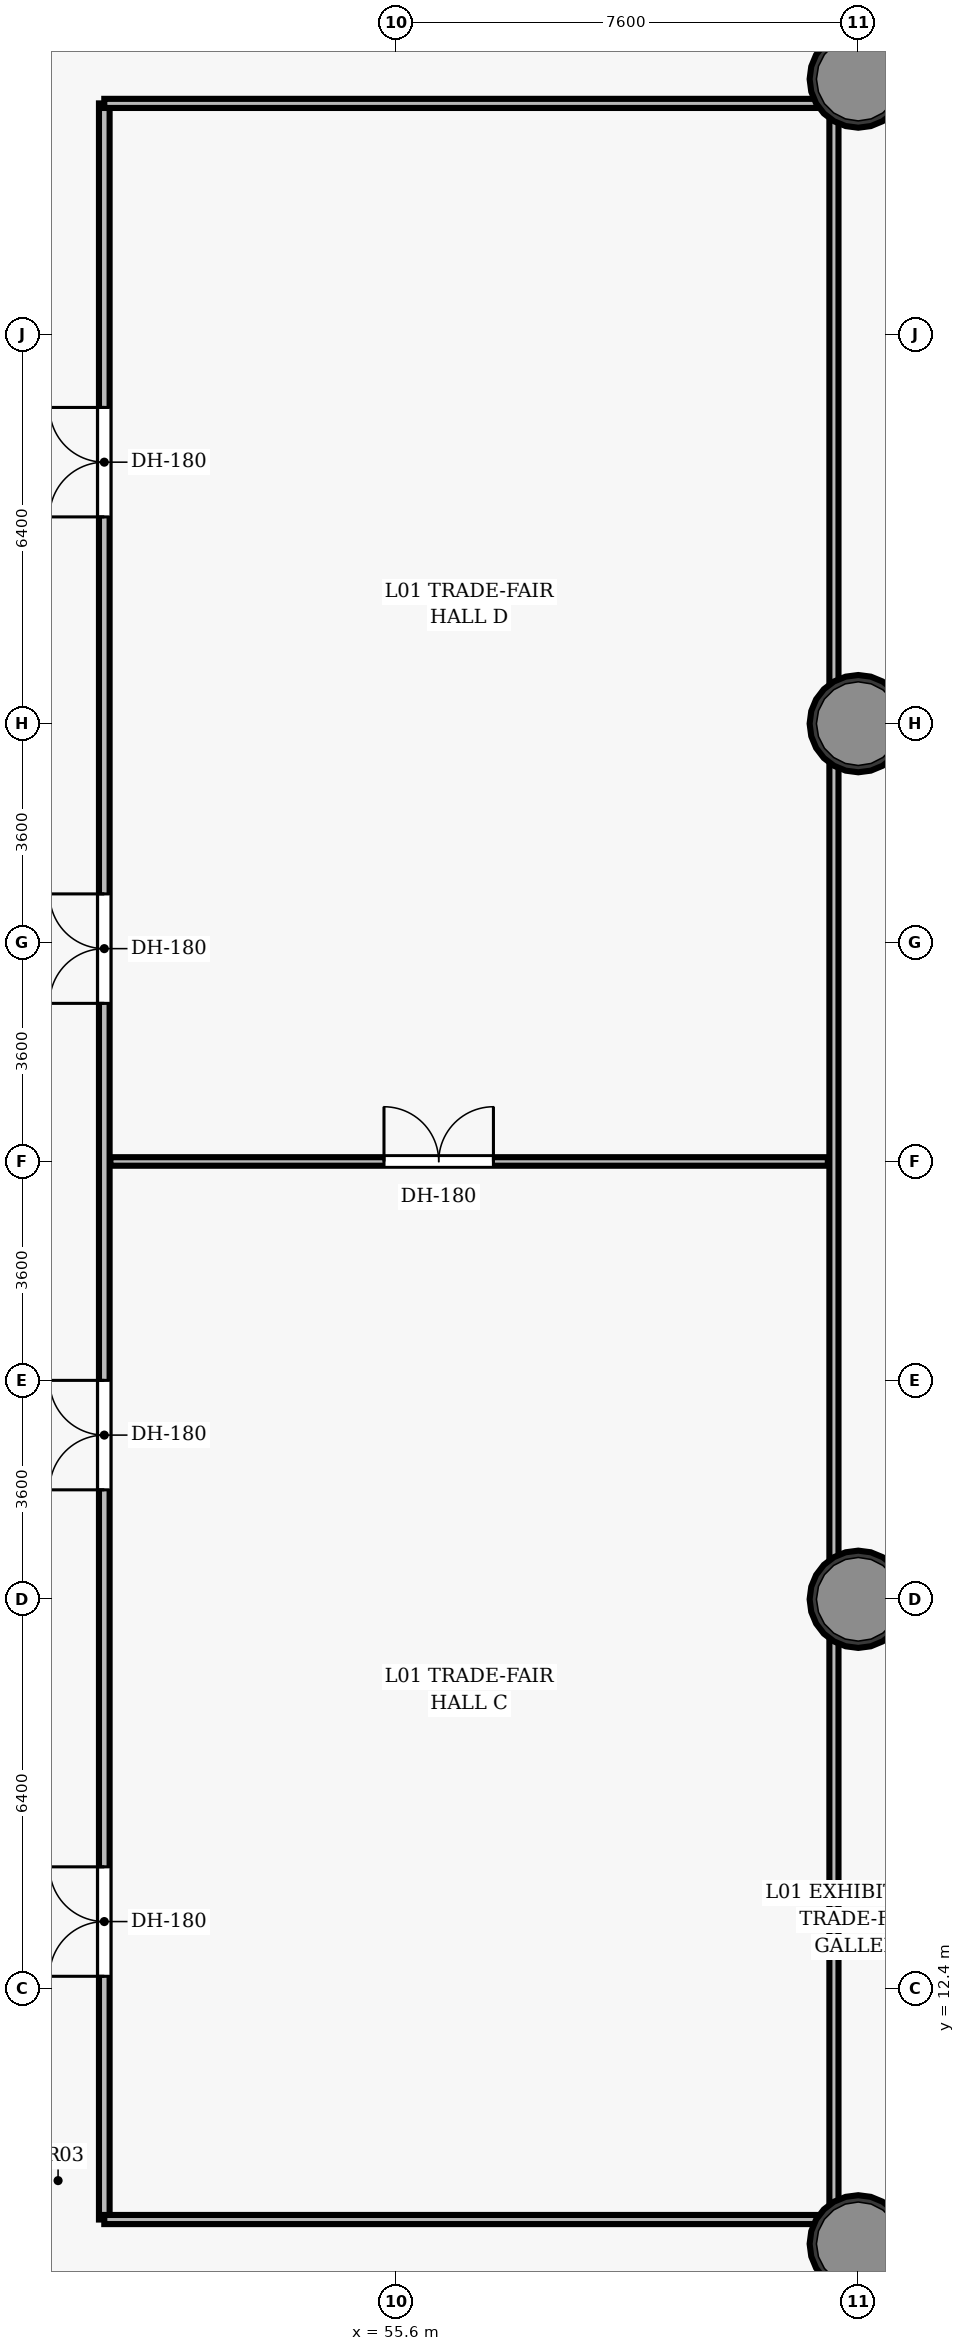
"""IFC4 building model, lengths in metres.
Left out: names, types, materials, properties, quantities, classifications, styles, units other than length and angle.
Written with IfcOpenShell. Run it as: python <this file> out.ifc"""

import sys

from ifc_helpers import new_model, si_unit, direction, frame, frame_2d, origin, origin_2d, place, context, subcontext, project, spatial, rectangle, hollow_circle, extrude, element, fill, save


model = new_model("IFC4")
c1 = context("Model", 3, precision=1e-05, world=origin(), true_north=direction((0.0, 1.0)))
c2 = subcontext(c1, "Body", "Model", "MODEL_VIEW")
j1 = project(units=[si_unit("LENGTHUNIT", "METRE"), si_unit("PLANEANGLEUNIT", "RADIAN")], contexts=[c1])
p1 = place(None, origin())
s1 = spatial("IfcSite", under=j1, at=p1, CompositionType="ELEMENT")
p2 = place(p1, origin())
s2 = spatial("IfcBuilding", under=s1, at=p2, CompositionType="ELEMENT")
p3 = place(p2, frame((0.0, 0.0, 6.6)))
s3 = spatial("IfcBuildingStorey", under=s2, at=p3, CompositionType="ELEMENT", Elevation=6.6)
for number, where, z_axis, x_axis in (
    (1, (63.2, 8.2, 0.0), (0.0, 0.0, 1.0), (1.0, 0.0, 0.0)),
    (2, (63.2, 18.8, 0.0), (0.0, 0.0, 1.0), (1.0, 0.0, 0.0)),
    (3, (63.2, 33.2, 0.0), (0.0, 0.0, 1.0), (1.0, 0.0, 0.0)),
    (4, (63.2, 43.8, 0.0), (0.0, 0.0, 1.0), (1.0, 0.0, 0.0)),
):
    element("IfcColumn", number, at=place(p3, frame(where, z_axis=z_axis, x_axis=x_axis)), inside=s3, PredefinedType="COLUMN", context=c2, shape_type="SweptSolid", body=[
        extrude(hollow_circle(Radius=0.8, WallThickness=0.06, at=origin_2d()), origin(), (0.0, 0.0, 1.0), 5.4),
    ])
p4 = place(p3, frame((50.8, 8.6, 0.0), z_axis=(0.0, 0.0, 1.0), x_axis=(0.0, 1.0, 0.0)))
e5 = element("IfcWall", 5, at=p4, inside=s3, PredefinedType="PARTITIONING", context=c2, shape_type="SweptSolid", body=[
    extrude(rectangle(XDim=34.8, YDim=0.175, at=frame_2d((17.4, 0.0))), origin(), (0.0, 0.0, 1.0), 4.11),
])
p5 = place(p4, frame((4.0, 0.0, 0.0)))
e6 = element("IfcOpeningElement", 6, at=p5, cuts=e5, PredefinedType="OPENING", context=c2, shape_type="SweptSolid", body=[
    extrude(rectangle(XDim=1.8, YDim=2.35, at=frame_2d((0.9, 1.175))), frame((0.0, 0.097, 0.0), z_axis=(0.0, -1.0, 0.0), x_axis=(1.0, 0.0, 0.0)), (0.0, 0.0, 1.0), 0.195),
])
p6 = place(p4, frame((12.0, 0.0, 0.0)))
e7 = element("IfcOpeningElement", 7, at=p6, cuts=e5, PredefinedType="OPENING", context=c2, shape_type="SweptSolid", body=[
    extrude(rectangle(XDim=1.8, YDim=2.35, at=frame_2d((0.9, 1.175))), frame((0.0, 0.097, 0.0), z_axis=(0.0, -1.0, 0.0), x_axis=(1.0, 0.0, 0.0)), (0.0, 0.0, 1.0), 0.195),
])
p7 = place(p4, frame((20.0, 0.0, 0.0)))
e8 = element("IfcOpeningElement", 8, at=p7, cuts=e5, PredefinedType="OPENING", context=c2, shape_type="SweptSolid", body=[
    extrude(rectangle(XDim=1.8, YDim=2.35, at=frame_2d((0.9, 1.175))), frame((0.0, 0.097, 0.0), z_axis=(0.0, -1.0, 0.0), x_axis=(1.0, 0.0, 0.0)), (0.0, 0.0, 1.0), 0.195),
])
p8 = place(p4, frame((28.0, 0.0, 0.0)))
e9 = element("IfcOpeningElement", 9, at=p8, cuts=e5, PredefinedType="OPENING", context=c2, shape_type="SweptSolid", body=[
    extrude(rectangle(XDim=1.8, YDim=2.35, at=frame_2d((0.9, 1.175))), frame((0.0, 0.097, 0.0), z_axis=(0.0, -1.0, 0.0), x_axis=(1.0, 0.0, 0.0)), (0.0, 0.0, 1.0), 0.195),
])
for number, where, z_axis, x_axis in (
    (10, (50.8, 8.6, 0.0), (0.0, 0.0, 1.0), (1.0, 0.0, 0.0)),
    (11, (50.8, 43.4, 0.0), (0.0, 0.0, 1.0), (1.0, 0.0, 0.0)),
):
    element("IfcWall", number, at=place(p3, frame(where, z_axis=z_axis, x_axis=x_axis)), inside=s3, PredefinedType="PARTITIONING", context=c2, shape_type="SweptSolid", body=[
        extrude(rectangle(XDim=12.0, YDim=0.15, at=frame_2d((6.0, 0.0))), origin(), (0.0, 0.0, 1.0), 4.11),
    ])
p9 = place(p3, frame((62.8, 8.6, 0.0), z_axis=(0.0, 0.0, 1.0), x_axis=(0.0, 1.0, 0.0)))
e12 = element("IfcWall", 12, at=p9, inside=s3, PredefinedType="PARTITIONING", context=c2, shape_type="SweptSolid", body=[
    extrude(rectangle(XDim=34.8, YDim=0.15, at=frame_2d((17.4, 0.0))), origin(), (0.0, 0.0, 1.0), 4.11),
])
p10 = place(p3, frame((50.9, 26.0, 0.0), z_axis=(0.0, 0.0, 1.0), x_axis=(1.0, 0.0, 0.0)))
e13 = element("IfcWall", 13, at=p10, inside=s3, PredefinedType="MOVABLE", context=c2, shape_type="SweptSolid", body=[
    extrude(rectangle(XDim=11.8, YDim=0.14, at=frame_2d((5.9, 0.0))), origin(), (0.0, 0.0, 1.0), 4.11),
])
p11 = place(p10, frame((4.5, 0.0, 0.0)))
e14 = element("IfcOpeningElement", 14, at=p11, cuts=e13, PredefinedType="OPENING", context=c2, shape_type="SweptSolid", body=[
    extrude(rectangle(XDim=1.8, YDim=2.35, at=frame_2d((0.9, 1.175))), frame((0.0, 0.08, 0.0), z_axis=(0.0, -1.0, 0.0), x_axis=(1.0, 0.0, 0.0)), (0.0, 0.0, 1.0), 0.16),
])
p12 = place(p11, origin())
e15 = element("IfcDoor", 15, at=p12, inside=s3, OperationType="DOUBLE_DOOR_SINGLE_SWING", PredefinedType="DOOR", context=c2, shape_type="SweptSolid", body=[
    extrude(rectangle(XDim=1.8, YDim=2.35, at=frame_2d((0.9, 1.175))), frame((0.0, 0.025, 0.0), z_axis=(0.0, -1.0, 0.0), x_axis=(1.0, 0.0, 0.0)), (0.0, 0.0, 1.0), 0.05),
])
fill(e14, e15)
p13 = place(p5, origin())
e16 = element("IfcDoor", 16, at=p13, inside=s3, OperationType="DOUBLE_DOOR_SINGLE_SWING", PredefinedType="DOOR", context=c2, shape_type="SweptSolid", body=[
    extrude(rectangle(XDim=1.8, YDim=2.35, at=frame_2d((0.9, 1.175))), frame((0.0, 0.025, 0.0), z_axis=(0.0, -1.0, 0.0), x_axis=(1.0, 0.0, 0.0)), (0.0, 0.0, 1.0), 0.05),
])
fill(e6, e16)
p14 = place(p6, origin())
e17 = element("IfcDoor", 17, at=p14, inside=s3, OperationType="DOUBLE_DOOR_SINGLE_SWING", PredefinedType="DOOR", context=c2, shape_type="SweptSolid", body=[
    extrude(rectangle(XDim=1.8, YDim=2.35, at=frame_2d((0.9, 1.175))), frame((0.0, 0.025, 0.0), z_axis=(0.0, -1.0, 0.0), x_axis=(1.0, 0.0, 0.0)), (0.0, 0.0, 1.0), 0.05),
])
fill(e7, e17)
p15 = place(p7, origin())
e18 = element("IfcDoor", 18, at=p15, inside=s3, OperationType="DOUBLE_DOOR_SINGLE_SWING", PredefinedType="DOOR", context=c2, shape_type="SweptSolid", body=[
    extrude(rectangle(XDim=1.8, YDim=2.35, at=frame_2d((0.9, 1.175))), frame((0.0, 0.025, 0.0), z_axis=(0.0, -1.0, 0.0), x_axis=(1.0, 0.0, 0.0)), (0.0, 0.0, 1.0), 0.05),
])
fill(e8, e18)
p16 = place(p8, origin())
e19 = element("IfcDoor", 19, at=p16, inside=s3, OperationType="DOUBLE_DOOR_SINGLE_SWING", PredefinedType="DOOR", context=c2, shape_type="SweptSolid", body=[
    extrude(rectangle(XDim=1.8, YDim=2.35, at=frame_2d((0.9, 1.175))), frame((0.0, 0.025, 0.0), z_axis=(0.0, -1.0, 0.0), x_axis=(1.0, 0.0, 0.0)), (0.0, 0.0, 1.0), 0.05),
])
fill(e9, e19)
save(model, sys.argv[1])
